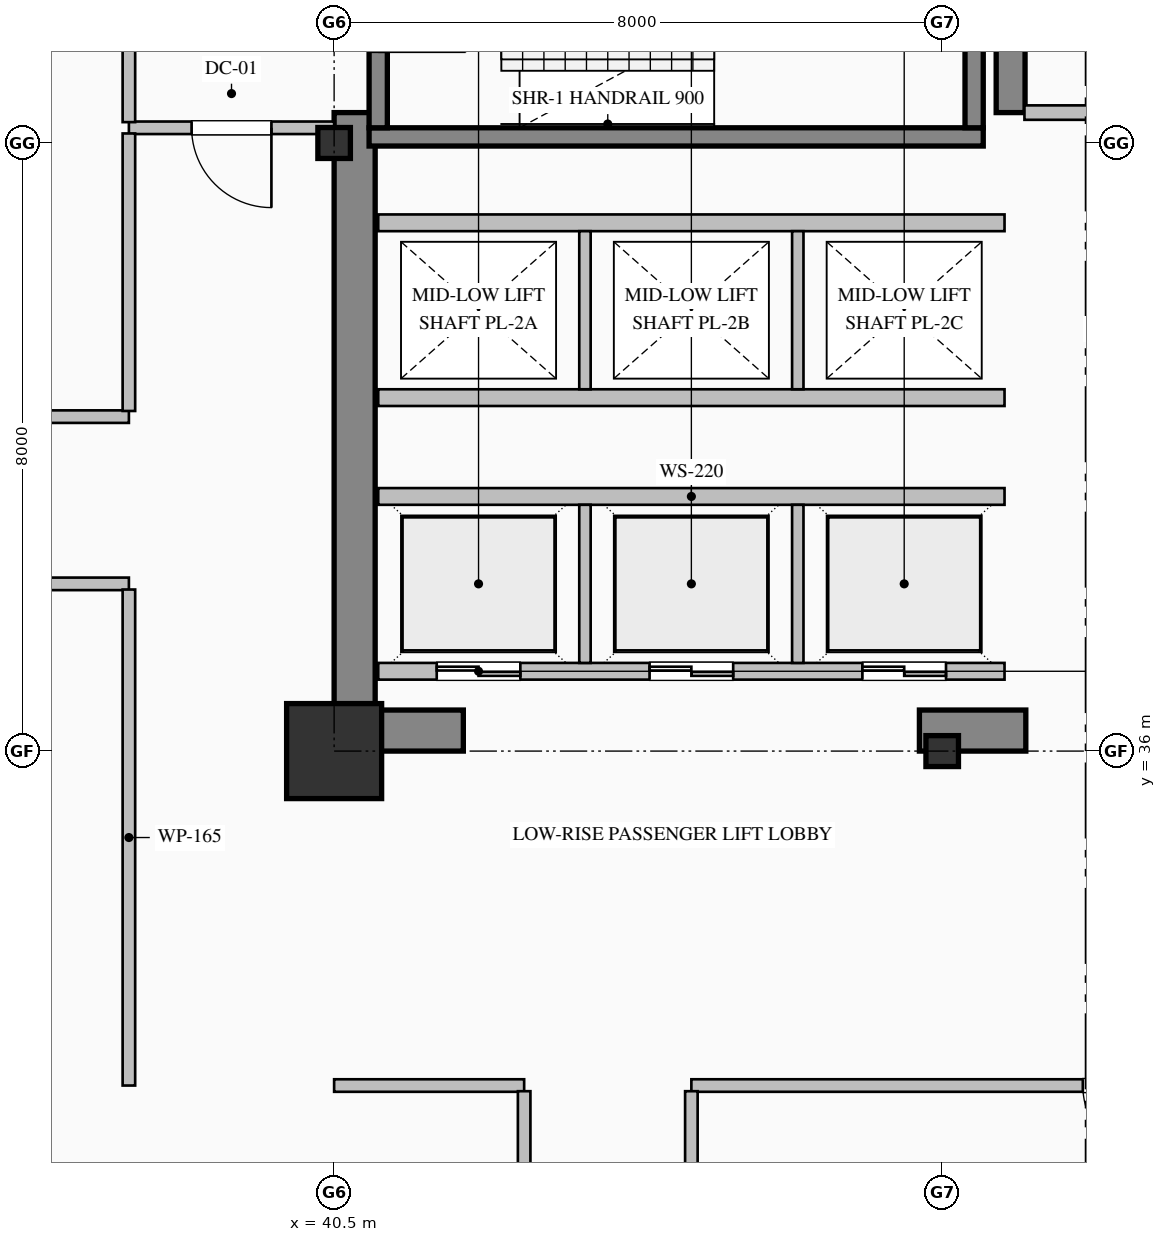
"""IFC4 building model, lengths in metres.
Left out: names, types, materials, properties, quantities, classifications, styles, units other than length and angle.
Written with IfcOpenShell. Run it as: python <this file> out.ifc"""

import sys

from ifc_helpers import new_model, si_unit, direction, frame, frame_2d, origin, origin_2d, place, context, subcontext, project, spatial, rectangle, hollow_rectangle, i_section, extrude, element, fill, save


model = new_model("IFC4")
c1 = context("Model", 3, precision=1e-05, world=origin(), true_north=direction((0.0, 1.0)))
c2 = subcontext(c1, "Body", "Model", "MODEL_VIEW")
j1 = project(units=[si_unit("LENGTHUNIT", "METRE"), si_unit("PLANEANGLEUNIT", "RADIAN")], contexts=[c1])
p1 = place(None, origin())
s1 = spatial("IfcSite", under=j1, at=p1, CompositionType="ELEMENT")
p2 = place(p1, origin())
s2 = spatial("IfcBuilding", under=s1, at=p2, CompositionType="ELEMENT")
p3 = place(p2, frame((0.0, 0.0, 40.2)))
s3 = spatial("IfcBuildingStorey", under=s2, at=p3, CompositionType="ELEMENT", Elevation=40.2)
p4 = place(p3, frame((40.77, 36.54, 0.0), z_axis=(0.0, 0.0, 1.0), x_axis=(0.0, 1.0, 0.0)))
e1 = element("IfcWall", 1, at=p4, inside=s3, PredefinedType="SHEAR", context=c2, shape_type="SweptSolid", body=[
    extrude(rectangle(XDim=7.86, YDim=0.54, at=frame_2d((3.93, 0.0))), origin(), (0.0, 0.0, 1.0), 3.75),
])
p5 = place(p3, frame((40.5, 36.27, 0.0), z_axis=(0.0, 0.0, 1.0), x_axis=(1.0, 0.0, 0.0)))
e2 = element("IfcWall", 2, at=p5, inside=s3, PredefinedType="SHEAR", context=c2, shape_type="SweptSolid", body=[
    extrude(rectangle(XDim=1.7, YDim=0.54, at=frame_2d((0.85, 0.0))), origin(), (0.0, 0.0, 1.0), 3.75),
])
p6 = place(p3, frame((48.2, 36.27, 0.0), z_axis=(0.0, 0.0, 1.0), x_axis=(1.0, 0.0, 0.0)))
e3 = element("IfcWall", 3, at=p6, inside=s3, PredefinedType="SHEAR", context=c2, shape_type="SweptSolid", body=[
    extrude(rectangle(XDim=1.4, YDim=0.54, at=frame_2d((0.7, 0.0))), origin(), (0.0, 0.0, 1.0), 3.75),
])
p7 = place(p3, frame((49.4, 44.4, 0.0), z_axis=(0.0, 0.0, 1.0), x_axis=(0.0, 1.0, 0.0)))
e4 = element("IfcWall", 4, at=p7, inside=s3, PredefinedType="SHEAR", context=c2, shape_type="SweptSolid", body=[
    extrude(rectangle(XDim=3.0, YDim=0.38, at=frame_2d((1.5, 0.0))), origin(), (0.0, 0.0, 1.0), 3.75),
])
p8 = place(p3, frame((40.5, 36.0, 0.0), z_axis=(0.0, 0.0, 1.0), x_axis=(1.0, 0.0, 0.0)))
e5 = element("IfcColumn", 5, at=p8, inside=s3, PredefinedType="COLUMN", context=c2, shape_type="SweptSolid", body=[
    extrude(hollow_rectangle(XDim=1.25, YDim=1.25, WallThickness=0.045, at=origin_2d()), origin(), (0.0, 0.0, 1.0), 4.0),
])
for number, where, z_axis, x_axis in (
    (6, (40.5, 44.0, 0.0), (0.0, 0.0, 1.0), (1.0, 0.0, 0.0)),
    (7, (48.5, 36.0, 0.0), (0.0, 0.0, 1.0), (1.0, 0.0, 0.0)),
):
    element("IfcColumn", number, at=place(p3, frame(where, z_axis=z_axis, x_axis=x_axis)), inside=s3, PredefinedType="COLUMN", context=c2, shape_type="SweptSolid", body=[
        extrude(i_section(OverallWidth=0.407, OverallDepth=0.428, WebThickness=0.02, FlangeThickness=0.035, FilletRadius=0.022, at=origin_2d()), origin(), (0.0, 0.0, 1.0), 4.0),
    ])
p9 = place(p3, frame((49.04, 44.08, 0.0), z_axis=(0.0, 0.0, 1.0), x_axis=(-1.0, 0.0, 0.0)))
e8 = element("IfcWall", 8, at=p9, inside=s3, PredefinedType="SOLIDWALL", context=c2, shape_type="SweptSolid", body=[
    extrude(rectangle(XDim=8.08, YDim=0.24, at=frame_2d((4.04, 0.0))), origin(), (0.0, 0.0, 1.0), 4.0),
])
p10 = place(p3, frame((41.08, 47.35, 0.0), z_axis=(0.0, 0.0, 1.0), x_axis=(0.0, -1.0, 0.0)))
e9 = element("IfcWall", 9, at=p10, inside=s3, PredefinedType="SOLIDWALL", context=c2, shape_type="SweptSolid", body=[
    extrude(rectangle(XDim=3.15, YDim=0.24, at=frame_2d((1.575, 0.0))), origin(), (0.0, 0.0, 1.0), 4.0),
])
p11 = place(p10, frame((1.0, 0.0, 0.0)))
e10 = element("IfcOpeningElement", 10, at=p11, cuts=e9, PredefinedType="OPENING", context=c2, shape_type="SweptSolid", body=[
    extrude(rectangle(XDim=1.15, YDim=2.2, at=frame_2d((0.575, 1.1))), frame((0.0, 0.13, 0.0), z_axis=(0.0, -1.0, 0.0), x_axis=(1.0, 0.0, 0.0)), (0.0, 0.0, 1.0), 0.26),
])
p12 = place(p3, frame((48.92, 44.2, 0.0), z_axis=(0.0, 0.0, 1.0), x_axis=(0.0, 1.0, 0.0)))
e11 = element("IfcWall", 11, at=p12, inside=s3, PredefinedType="SOLIDWALL", context=c2, shape_type="SweptSolid", body=[
    extrude(rectangle(XDim=3.15, YDim=0.24, at=frame_2d((1.575, 0.0))), origin(), (0.0, 0.0, 1.0), 4.0),
])
p13 = place(p3, frame((49.32, 37.05, 0.0), z_axis=(0.0, 0.0, 1.0), x_axis=(-1.0, 0.0, 0.0)))
e12 = element("IfcWall", 12, at=p13, inside=s3, PredefinedType="PARTITIONING", context=c2, shape_type="SweptSolid", body=[
    extrude(rectangle(XDim=8.24, YDim=0.22, at=frame_2d((4.12, 0.0))), origin(), (0.0, 0.0, 1.0), 3.75),
])
p14 = place(p13, frame((6.37, 0.0, 0.0)))
e13 = element("IfcOpeningElement", 13, at=p14, cuts=e12, PredefinedType="OPENING", context=c2, shape_type="SweptSolid", body=[
    extrude(rectangle(XDim=1.1, YDim=2.2, at=frame_2d((0.55, 1.1))), frame((0.0, 0.12, 0.0), z_axis=(0.0, -1.0, 0.0), x_axis=(1.0, 0.0, 0.0)), (0.0, 0.0, 1.0), 0.24),
])
p15 = place(p13, frame((3.57, 0.0, 0.0)))
e14 = element("IfcOpeningElement", 14, at=p15, cuts=e12, PredefinedType="OPENING", context=c2, shape_type="SweptSolid", body=[
    extrude(rectangle(XDim=1.1, YDim=2.2, at=frame_2d((0.55, 1.1))), frame((0.0, 0.12, 0.0), z_axis=(0.0, -1.0, 0.0), x_axis=(1.0, 0.0, 0.0)), (0.0, 0.0, 1.0), 0.24),
])
p16 = place(p13, frame((0.77, 0.0, 0.0)))
e15 = element("IfcOpeningElement", 15, at=p16, cuts=e12, PredefinedType="OPENING", context=c2, shape_type="SweptSolid", body=[
    extrude(rectangle(XDim=1.1, YDim=2.2, at=frame_2d((0.55, 1.1))), frame((0.0, 0.12, 0.0), z_axis=(0.0, -1.0, 0.0), x_axis=(1.0, 0.0, 0.0)), (0.0, 0.0, 1.0), 0.24),
])
p17 = place(p3, frame((41.08, 39.35, 0.0), z_axis=(0.0, 0.0, 1.0), x_axis=(1.0, 0.0, 0.0)))
e16 = element("IfcWall", 16, at=p17, inside=s3, PredefinedType="PARTITIONING", context=c2, shape_type="SweptSolid", body=[
    extrude(rectangle(XDim=8.24, YDim=0.22, at=frame_2d((4.12, 0.0))), origin(), (0.0, 0.0, 1.0), 3.75),
])
for number, where, z_axis, x_axis in (
    (17, (43.8, 37.16, 0.0), (0.0, 0.0, 1.0), (0.0, 1.0, 0.0)),
    (18, (46.6, 37.16, 0.0), (0.0, 0.0, 1.0), (0.0, 1.0, 0.0)),
):
    element("IfcWall", number, at=place(p3, frame(where, z_axis=z_axis, x_axis=x_axis)), inside=s3, PredefinedType="PARTITIONING", context=c2, shape_type="SweptSolid", body=[
        extrude(rectangle(XDim=2.08, YDim=0.15, at=frame_2d((1.04, 0.0))), origin(), (0.0, 0.0, 1.0), 3.75),
    ])
for number, where, z_axis, x_axis in (
    (19, (49.32, 40.65, 0.0), (0.0, 0.0, 1.0), (-1.0, 0.0, 0.0)),
    (20, (41.08, 42.95, 0.0), (0.0, 0.0, 1.0), (1.0, 0.0, 0.0)),
):
    element("IfcWall", number, at=place(p3, frame(where, z_axis=z_axis, x_axis=x_axis)), inside=s3, PredefinedType="PARTITIONING", context=c2, shape_type="SweptSolid", body=[
        extrude(rectangle(XDim=8.24, YDim=0.22, at=frame_2d((4.12, 0.0))), origin(), (0.0, 0.0, 1.0), 3.75),
    ])
for number, where, z_axis, x_axis in (
    (21, (43.8, 40.76, 0.0), (0.0, 0.0, 1.0), (0.0, 1.0, 0.0)),
    (22, (46.6, 40.76, 0.0), (0.0, 0.0, 1.0), (0.0, 1.0, 0.0)),
):
    element("IfcWall", number, at=place(p3, frame(where, z_axis=z_axis, x_axis=x_axis)), inside=s3, PredefinedType="PARTITIONING", context=c2, shape_type="SweptSolid", body=[
        extrude(rectangle(XDim=2.08, YDim=0.15, at=frame_2d((1.04, 0.0))), origin(), (0.0, 0.0, 1.0), 3.75),
    ])
p18 = place(p3, frame((40.5, 44.2, 0.0), z_axis=(0.0, 0.0, 1.0), x_axis=(-1.0, 0.0, 0.0)))
e23 = element("IfcWall", 23, at=p18, inside=s3, PredefinedType="PARTITIONING", context=c2, shape_type="SweptSolid", body=[
    extrude(rectangle(XDim=2.7, YDim=0.165, at=frame_2d((1.35, 0.0))), origin(), (0.0, 0.0, 1.0), 3.75),
])
p19 = place(p18, frame((0.825, 0.0, 0.0)))
e24 = element("IfcOpeningElement", 24, at=p19, cuts=e23, PredefinedType="OPENING", context=c2, shape_type="SweptSolid", body=[
    extrude(rectangle(XDim=1.05, YDim=2.15, at=frame_2d((0.525, 1.075))), frame((0.0, 0.093, 0.0), z_axis=(0.0, -1.0, 0.0), x_axis=(1.0, 0.0, 0.0)), (0.0, 0.0, 1.0), 0.185),
])
p20 = place(p3, frame((37.8, 44.274, 0.0), z_axis=(0.0, 0.0, 1.0), x_axis=(0.0, 1.0, 0.0)))
e25 = element("IfcWall", 25, at=p20, inside=s3, PredefinedType="PARTITIONING", context=c2, shape_type="SweptSolid", body=[
    extrude(rectangle(XDim=3.051, YDim=0.165, at=frame_2d((1.525, 0.0))), origin(), (0.0, 0.0, 1.0), 3.75),
])
p21 = place(p3, frame((54.718, 44.4, 0.0), z_axis=(0.0, 0.0, 1.0), x_axis=(-1.0, 0.0, 0.0)))
e26 = element("IfcWall", 26, at=p21, inside=s3, PredefinedType="PARTITIONING", context=c2, shape_type="SweptSolid", body=[
    extrude(rectangle(XDim=5.136, YDim=0.19, at=frame_2d((2.568, 0.0))), origin(), (0.0, 0.0, 1.0), 3.75),
])
p22 = place(p21, frame((2.043, 0.0, 0.0)))
e27 = element("IfcOpeningElement", 27, at=p22, cuts=e26, PredefinedType="OPENING", context=c2, shape_type="SweptSolid", body=[
    extrude(rectangle(XDim=1.05, YDim=2.15, at=frame_2d((0.525, 1.075))), frame((0.0, 0.105, 0.0), z_axis=(0.0, -1.0, 0.0), x_axis=(1.0, 0.0, 0.0)), (0.0, 0.0, 1.0), 0.21),
])
p23 = place(p3, frame((37.8, 38.2, 0.0), z_axis=(0.0, 0.0, 1.0), x_axis=(-1.0, 0.0, 0.0)))
e28 = element("IfcWall", 28, at=p23, inside=s3, PredefinedType="PARTITIONING", context=c2, shape_type="SweptSolid", body=[
    extrude(rectangle(XDim=28.8, YDim=0.165, at=frame_2d((14.4, 0.0))), origin(), (0.0, 0.0, 1.0), 3.75),
])
p24 = place(p23, frame((13.9, 0.0, 0.0)))
e29 = element("IfcOpeningElement", 29, at=p24, cuts=e28, PredefinedType="OPENING", context=c2, shape_type="SweptSolid", body=[
    extrude(rectangle(XDim=1.0, YDim=2.15, at=frame_2d((0.5, 1.075))), frame((0.0, 0.093, 0.0), z_axis=(0.0, -1.0, 0.0), x_axis=(1.0, 0.0, 0.0)), (0.0, 0.0, 1.0), 0.185),
])
p25 = place(p3, frame((32.5, 40.4, 0.0), z_axis=(0.0, 0.0, 1.0), x_axis=(1.0, 0.0, 0.0)))
e30 = element("IfcWall", 30, at=p25, inside=s3, PredefinedType="PARTITIONING", context=c2, shape_type="SweptSolid", body=[
    extrude(rectangle(XDim=5.3, YDim=0.165, at=frame_2d((2.65, 0.0))), origin(), (0.0, 0.0, 1.0), 3.75),
])
p26 = place(p25, frame((2.15, 0.0, 0.0)))
e31 = element("IfcOpeningElement", 31, at=p26, cuts=e30, PredefinedType="OPENING", context=c2, shape_type="SweptSolid", body=[
    extrude(rectangle(XDim=1.0, YDim=2.15, at=frame_2d((0.5, 1.075))), frame((0.0, 0.093, 0.0), z_axis=(0.0, -1.0, 0.0), x_axis=(1.0, 0.0, 0.0)), (0.0, 0.0, 1.0), 0.185),
])
p27 = place(p3, frame((37.8, 31.6, 0.0), z_axis=(0.0, 0.0, 1.0), x_axis=(0.0, 1.0, 0.0)))
e32 = element("IfcWall", 32, at=p27, inside=s3, PredefinedType="PARTITIONING", context=c2, shape_type="SweptSolid", body=[
    extrude(rectangle(XDim=6.525, YDim=0.165, at=frame_2d((3.263, 0.0))), origin(), (0.0, 0.0, 1.0), 3.75),
])
p28 = place(p3, frame((37.8, 40.475, 0.0), z_axis=(0.0, 0.0, 1.0), x_axis=(0.0, 1.0, 0.0)))
e33 = element("IfcWall", 33, at=p28, inside=s3, PredefinedType="PARTITIONING", context=c2, shape_type="SweptSolid", body=[
    extrude(rectangle(XDim=3.651, YDim=0.165, at=frame_2d((1.825, 0.0))), origin(), (0.0, 0.0, 1.0), 3.75),
])
p29 = place(p3, frame((56.5, 31.6, 0.0), z_axis=(0.0, 0.0, 1.0), x_axis=(-1.0, 0.0, 0.0)))
e34 = element("IfcWall", 34, at=p29, inside=s3, PredefinedType="PARTITIONING", context=c2, shape_type="SweptSolid", body=[
    extrude(rectangle(XDim=11.3, YDim=0.165, at=frame_2d((5.65, 0.0))), origin(), (0.0, 0.0, 1.0), 3.75),
])
p30 = place(p29, frame((5.15, 0.0, 0.0)))
e35 = element("IfcOpeningElement", 35, at=p30, cuts=e34, PredefinedType="OPENING", context=c2, shape_type="SweptSolid", body=[
    extrude(rectangle(XDim=1.0, YDim=2.15, at=frame_2d((0.5, 1.075))), frame((0.0, 0.093, 0.0), z_axis=(0.0, -1.0, 0.0), x_axis=(1.0, 0.0, 0.0)), (0.0, 0.0, 1.0), 0.185),
])
p31 = place(p3, frame((43.0, 31.6, 0.0), z_axis=(0.0, 0.0, 1.0), x_axis=(-1.0, 0.0, 0.0)))
e36 = element("IfcWall", 36, at=p31, inside=s3, PredefinedType="PARTITIONING", context=c2, shape_type="SweptSolid", body=[
    extrude(rectangle(XDim=2.5, YDim=0.165, at=frame_2d((1.25, 0.0))), origin(), (0.0, 0.0, 1.0), 3.75),
])
p32 = place(p3, frame((45.2, 31.525, 0.0), z_axis=(0.0, 0.0, 1.0), x_axis=(0.0, -1.0, 0.0)))
e37 = element("IfcWall", 37, at=p32, inside=s3, PredefinedType="PARTITIONING", context=c2, shape_type="SweptSolid", body=[
    extrude(rectangle(XDim=3.478, YDim=0.165, at=frame_2d((1.739, 0.0))), origin(), (0.0, 0.0, 1.0), 3.75),
])
p33 = place(p3, frame((43.0, 28.047, 0.0), z_axis=(0.0, 0.0, 1.0), x_axis=(0.0, 1.0, 0.0)))
e38 = element("IfcWall", 38, at=p33, inside=s3, PredefinedType="PARTITIONING", context=c2, shape_type="SweptSolid", body=[
    extrude(rectangle(XDim=3.478, YDim=0.165, at=frame_2d((1.739, 0.0))), origin(), (0.0, 0.0, 1.0), 3.75),
])
p34 = place(p33, frame((1.239, 0.0, 0.0)))
e39 = element("IfcOpeningElement", 39, at=p34, cuts=e38, PredefinedType="OPENING", context=c2, shape_type="SweptSolid", body=[
    extrude(rectangle(XDim=1.0, YDim=2.15, at=frame_2d((0.5, 1.075))), frame((0.0, 0.093, 0.0), z_axis=(0.0, -1.0, 0.0), x_axis=(1.0, 0.0, 0.0)), (0.0, 0.0, 1.0), 0.185),
])
p35 = place(p14, origin())
e40 = element("IfcDoor", 40, at=p35, inside=s3, OperationType="DOUBLE_DOOR_SLIDING", PredefinedType="DOOR", context=c2, shape_type="SweptSolid", body=[
    extrude(rectangle(XDim=1.1, YDim=2.2, at=frame_2d((0.55, 1.1))), frame((0.0, 0.025, 0.0), z_axis=(0.0, -1.0, 0.0), x_axis=(1.0, 0.0, 0.0)), (0.0, 0.0, 1.0), 0.05),
])
fill(e13, e40)
p36 = place(p15, origin())
e41 = element("IfcDoor", 41, at=p36, inside=s3, OperationType="DOUBLE_DOOR_SLIDING", PredefinedType="DOOR", context=c2, shape_type="SweptSolid", body=[
    extrude(rectangle(XDim=1.1, YDim=2.2, at=frame_2d((0.55, 1.1))), frame((0.0, 0.025, 0.0), z_axis=(0.0, -1.0, 0.0), x_axis=(1.0, 0.0, 0.0)), (0.0, 0.0, 1.0), 0.05),
])
fill(e14, e41)
p37 = place(p16, origin())
e42 = element("IfcDoor", 42, at=p37, inside=s3, OperationType="DOUBLE_DOOR_SLIDING", PredefinedType="DOOR", context=c2, shape_type="SweptSolid", body=[
    extrude(rectangle(XDim=1.1, YDim=2.2, at=frame_2d((0.55, 1.1))), frame((0.0, 0.025, 0.0), z_axis=(0.0, -1.0, 0.0), x_axis=(1.0, 0.0, 0.0)), (0.0, 0.0, 1.0), 0.05),
])
fill(e15, e42)
p38 = place(p19, origin())
e43 = element("IfcDoor", 43, at=p38, inside=s3, OperationType="SINGLE_SWING_LEFT", PredefinedType="DOOR", context=c2, shape_type="SweptSolid", body=[
    extrude(rectangle(XDim=1.05, YDim=2.15, at=frame_2d((0.525, 1.075))), frame((0.0, 0.025, 0.0), z_axis=(0.0, -1.0, 0.0), x_axis=(1.0, 0.0, 0.0)), (0.0, 0.0, 1.0), 0.05),
])
fill(e24, e43)
p39 = place(p30, origin())
e44 = element("IfcDoor", 44, at=p39, inside=s3, OperationType="SINGLE_SWING_LEFT", PredefinedType="DOOR", context=c2, shape_type="SweptSolid", body=[
    extrude(rectangle(XDim=1.0, YDim=2.15, at=frame_2d((0.5, 1.075))), frame((0.0, 0.025, 0.0), z_axis=(0.0, -1.0, 0.0), x_axis=(1.0, 0.0, 0.0)), (0.0, 0.0, 1.0), 0.05),
])
fill(e35, e44)
save(model, sys.argv[1])
